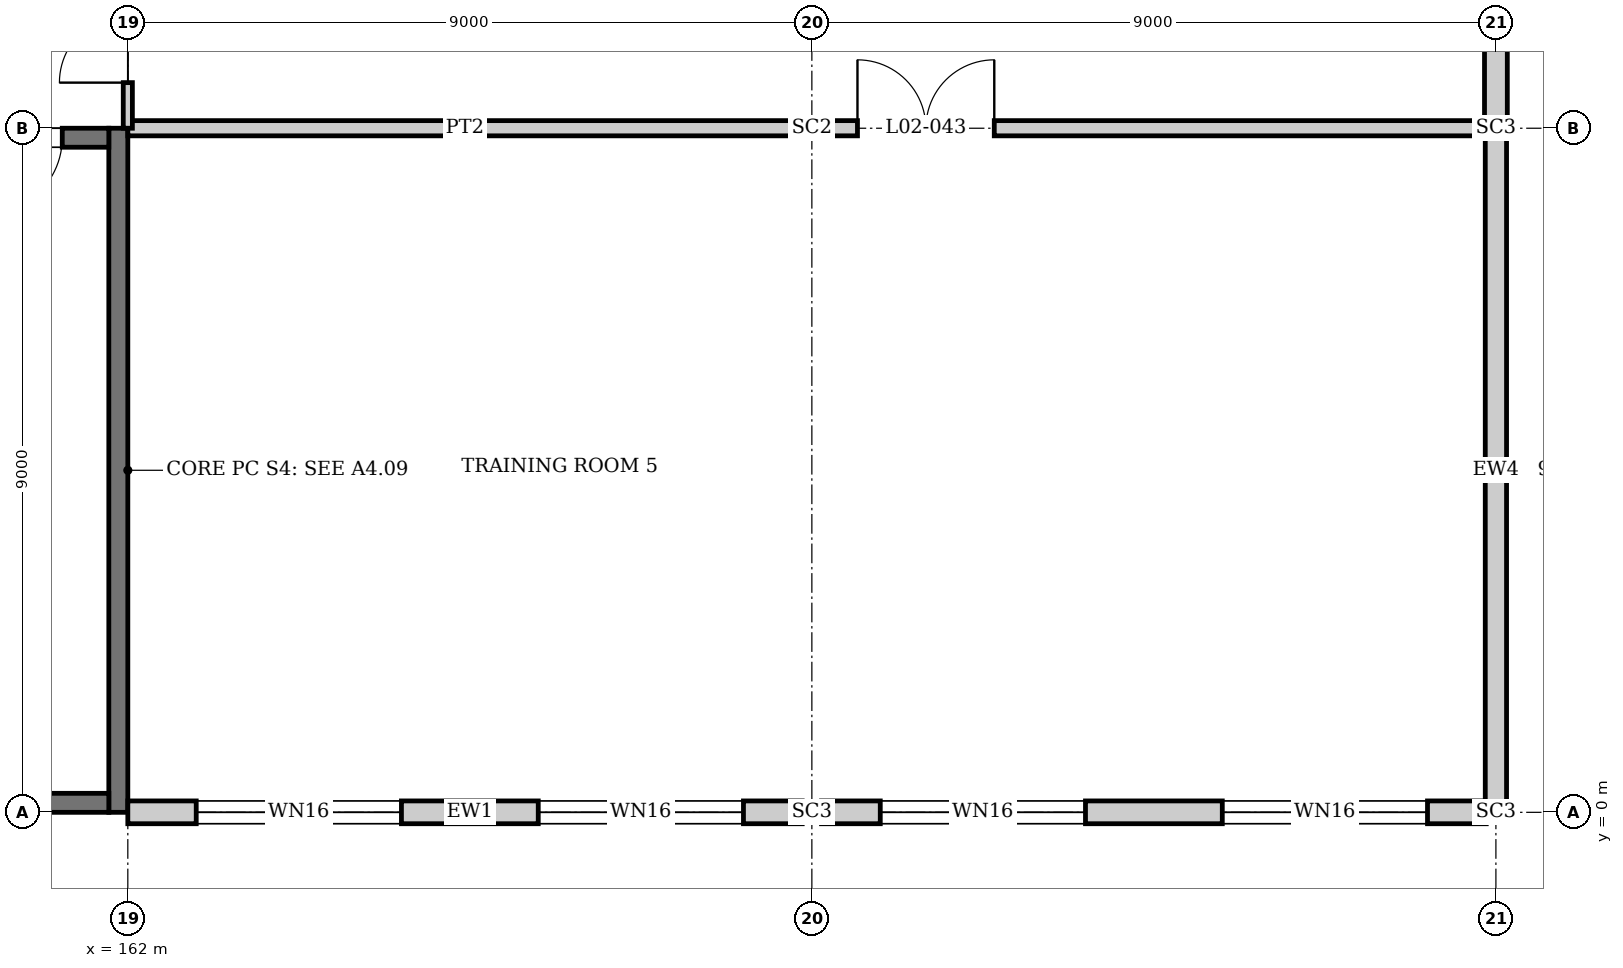
"""IFC4 building model, lengths in metres.
Left out: names, types, materials, properties, quantities, classifications, styles, units other than length and angle.
Written with IfcOpenShell. Run it as: python <this file> out.ifc"""

import sys

from ifc_helpers import new_model, si_unit, direction, frame, frame_2d, origin, origin_2d, place, context, subcontext, project, spatial, rectangle, i_section, extrude, element, fill, save


model = new_model("IFC4")
c1 = context("Model", 3, precision=1e-05, world=origin(), true_north=direction((0.0, 1.0)))
c2 = subcontext(c1, "Body", "Model", "MODEL_VIEW")
j1 = project(units=[si_unit("LENGTHUNIT", "METRE"), si_unit("PLANEANGLEUNIT", "RADIAN")], contexts=[c1])
p1 = place(None, origin())
s1 = spatial("IfcSite", under=j1, at=p1, CompositionType="ELEMENT")
p2 = place(p1, origin())
s2 = spatial("IfcBuilding", under=s1, at=p2, CompositionType="ELEMENT")
p3 = place(p2, frame((0.0, 0.0, 10.5)))
s3 = spatial("IfcBuildingStorey", under=s2, at=p3, CompositionType="ELEMENT", Elevation=10.5)
p4 = place(p3, frame((171.0, 0.0, 0.0), z_axis=(0.0, 0.0, 1.0), x_axis=(0.0, 1.0, 0.0)))
e1 = element("IfcColumn", 1, at=p4, inside=s3, PredefinedType="COLUMN", context=c2, shape_type="SweptSolid", body=[
    extrude(i_section(OverallWidth=0.254, OverallDepth=0.254, WebThickness=0.009, FlangeThickness=0.014, at=origin_2d()), origin(), (0.0, 0.0, 1.0), 4.5),
])
p5 = place(p3, frame((171.0, 9.0, 0.0), z_axis=(0.0, 0.0, 1.0), x_axis=(0.0, 1.0, 0.0)))
e2 = element("IfcColumn", 2, at=p5, inside=s3, PredefinedType="COLUMN", context=c2, shape_type="SweptSolid", body=[
    extrude(i_section(OverallWidth=0.256, OverallDepth=0.26, WebThickness=0.01, FlangeThickness=0.017, at=origin_2d()), origin(), (0.0, 0.0, 1.0), 4.5),
])
for number, where, z_axis, x_axis in (
    (3, (180.0, 0.0, 0.0), (0.0, 0.0, 1.0), (0.0, 1.0, 0.0)),
    (4, (180.0, 9.0, 0.0), (0.0, 0.0, 1.0), (0.0, 1.0, 0.0)),
):
    element("IfcColumn", number, at=place(p3, frame(where, z_axis=z_axis, x_axis=x_axis)), inside=s3, PredefinedType="COLUMN", context=c2, shape_type="SweptSolid", body=[
        extrude(i_section(OverallWidth=0.254, OverallDepth=0.254, WebThickness=0.009, FlangeThickness=0.014, at=origin_2d()), origin(), (0.0, 0.0, 1.0), 4.5),
    ])
p6 = place(p3, frame((161.875, 0.0, 0.0), z_axis=(0.0, 0.0, 1.0), x_axis=(0.0, 1.0, 0.0)))
e5 = element("IfcWall", 5, at=p6, inside=s3, PredefinedType="SHEAR", context=c2, shape_type="SweptSolid", body=[
    extrude(rectangle(XDim=9.0, YDim=0.25, at=frame_2d((4.5, 0.0))), origin(), (0.0, 0.0, 1.0), 4.35),
])
p7 = place(p3, frame((153.25, 0.125, 0.0), z_axis=(0.0, 0.0, 1.0), x_axis=(1.0, 0.0, 0.0)))
e6 = element("IfcWall", 6, at=p7, inside=s3, PredefinedType="SHEAR", context=c2, shape_type="SweptSolid", body=[
    extrude(rectangle(XDim=8.5, YDim=0.25, at=frame_2d((4.25, 0.0))), origin(), (0.0, 0.0, 1.0), 4.35),
])
p8 = place(p3, frame((153.25, 8.875, 0.0), z_axis=(0.0, 0.0, 1.0), x_axis=(1.0, 0.0, 0.0)))
e7 = element("IfcWall", 7, at=p8, inside=s3, PredefinedType="SHEAR", context=c2, shape_type="SweptSolid", body=[
    extrude(rectangle(XDim=8.5, YDim=0.25, at=frame_2d((4.25, 0.0))), origin(), (0.0, 0.0, 1.0), 4.35),
])
p9 = place(p8, frame((6.887, 0.0, 0.0)))
e8 = element("IfcOpeningElement", 8, at=p9, cuts=e7, PredefinedType="OPENING", context=c2, shape_type="SweptSolid", body=[
    extrude(rectangle(XDim=1.0, YDim=2.1, at=frame_2d((0.5, 1.05))), frame((0.0, 0.135, 0.0), z_axis=(0.0, -1.0, 0.0), x_axis=(1.0, 0.0, 0.0)), (0.0, 0.0, 1.0), 0.27),
])
p10 = place(p3, frame((162.0, 0.0, 0.0), z_axis=(0.0, 0.0, 1.0), x_axis=(1.0, 0.0, 0.0)))
e9 = element("IfcWall", 9, at=p10, inside=s3, PredefinedType="SOLIDWALL", context=c2, shape_type="SweptSolid", body=[
    extrude(rectangle(XDim=8.873, YDim=0.3, at=frame_2d((4.437, 0.0))), origin(), (0.0, 0.0, 1.0), 3.991),
])
p11 = place(p10, frame((0.9, 0.0, 0.9)))
e10 = element("IfcOpeningElement", 10, at=p11, cuts=e9, PredefinedType="OPENING", context=c2, shape_type="SweptSolid", body=[
    extrude(rectangle(XDim=2.7, YDim=1.8, at=frame_2d((1.35, 0.9))), frame((0.0, 0.16, 0.0), z_axis=(0.0, -1.0, 0.0), x_axis=(1.0, 0.0, 0.0)), (0.0, 0.0, 1.0), 0.32),
])
p12 = place(p10, frame((5.4, 0.0, 0.9)))
e11 = element("IfcOpeningElement", 11, at=p12, cuts=e9, PredefinedType="OPENING", context=c2, shape_type="SweptSolid", body=[
    extrude(rectangle(XDim=2.7, YDim=1.8, at=frame_2d((1.35, 0.9))), frame((0.0, 0.16, 0.0), z_axis=(0.0, -1.0, 0.0), x_axis=(1.0, 0.0, 0.0)), (0.0, 0.0, 1.0), 0.32),
])
p13 = place(p3, frame((171.127, 0.0, 0.0), z_axis=(0.0, 0.0, 1.0), x_axis=(1.0, 0.0, 0.0)))
e12 = element("IfcWall", 12, at=p13, inside=s3, PredefinedType="SOLIDWALL", context=c2, shape_type="SweptSolid", body=[
    extrude(rectangle(XDim=8.746, YDim=0.3, at=frame_2d((4.373, 0.0))), origin(), (0.0, 0.0, 1.0), 3.991),
])
p14 = place(p13, frame((0.773, 0.0, 0.9)))
e13 = element("IfcOpeningElement", 13, at=p14, cuts=e12, PredefinedType="OPENING", context=c2, shape_type="SweptSolid", body=[
    extrude(rectangle(XDim=2.7, YDim=1.8, at=frame_2d((1.35, 0.9))), frame((0.0, 0.16, 0.0), z_axis=(0.0, -1.0, 0.0), x_axis=(1.0, 0.0, 0.0)), (0.0, 0.0, 1.0), 0.32),
])
p15 = place(p13, frame((5.273, 0.0, 0.9)))
e14 = element("IfcOpeningElement", 14, at=p15, cuts=e12, PredefinedType="OPENING", context=c2, shape_type="SweptSolid", body=[
    extrude(rectangle(XDim=2.7, YDim=1.8, at=frame_2d((1.35, 0.9))), frame((0.0, 0.16, 0.0), z_axis=(0.0, -1.0, 0.0), x_axis=(1.0, 0.0, 0.0)), (0.0, 0.0, 1.0), 0.32),
])
p16 = place(p3, frame((180.0, 0.127, 0.0), z_axis=(0.0, 0.0, 1.0), x_axis=(0.0, 1.0, 0.0)))
e15 = element("IfcWall", 15, at=p16, inside=s3, PredefinedType="SOLIDWALL", context=c2, shape_type="SweptSolid", body=[
    extrude(rectangle(XDim=8.746, YDim=0.28, at=frame_2d((4.373, 0.0))), origin(), (0.0, 0.0, 1.0), 3.991),
])
p17 = place(p3, frame((180.0, 9.127, 0.0), z_axis=(0.0, 0.0, 1.0), x_axis=(0.0, 1.0, 0.0)))
e16 = element("IfcWall", 16, at=p17, inside=s3, PredefinedType="SOLIDWALL", context=c2, shape_type="SweptSolid", body=[
    extrude(rectangle(XDim=8.873, YDim=0.3, at=frame_2d((4.437, 0.0))), origin(), (0.0, 0.0, 1.0), 3.991),
])
p18 = place(p17, frame((1.223, 0.0, 0.9)))
e17 = element("IfcOpeningElement", 17, at=p18, cuts=e16, PredefinedType="OPENING", context=c2, shape_type="SweptSolid", body=[
    extrude(rectangle(XDim=1.8, YDim=2.4, at=frame_2d((0.9, 1.2))), frame((0.0, 0.16, 0.0), z_axis=(0.0, -1.0, 0.0), x_axis=(1.0, 0.0, 0.0)), (0.0, 0.0, 1.0), 0.32),
])
p19 = place(p17, frame((5.723, 0.0, 0.9)))
e18 = element("IfcOpeningElement", 18, at=p19, cuts=e16, PredefinedType="OPENING", context=c2, shape_type="SweptSolid", body=[
    extrude(rectangle(XDim=1.8, YDim=2.4, at=frame_2d((0.9, 1.2))), frame((0.0, 0.16, 0.0), z_axis=(0.0, -1.0, 0.0), x_axis=(1.0, 0.0, 0.0)), (0.0, 0.0, 1.0), 0.32),
])
p20 = place(p3, frame((162.0, 9.0, 0.0), z_axis=(0.0, 0.0, 1.0), x_axis=(1.0, 0.0, 0.0)))
e19 = element("IfcWall", 19, at=p20, inside=s3, PredefinedType="PARTITIONING", context=c2, shape_type="SweptSolid", body=[
    extrude(rectangle(XDim=8.87, YDim=0.2, at=frame_2d((4.435, 0.0))), origin(), (0.0, 0.0, 1.0), 3.822),
])
p21 = place(p3, frame((171.13, 9.0, 0.0), z_axis=(0.0, 0.0, 1.0), x_axis=(1.0, 0.0, 0.0)))
e20 = element("IfcWall", 20, at=p21, inside=s3, PredefinedType="PARTITIONING", context=c2, shape_type="SweptSolid", body=[
    extrude(rectangle(XDim=8.743, YDim=0.2, at=frame_2d((4.372, 0.0))), origin(), (0.0, 0.0, 1.0), 3.822),
])
p22 = place(p21, frame((0.47, 0.0, 0.0)))
e21 = element("IfcOpeningElement", 21, at=p22, cuts=e20, PredefinedType="OPENING", context=c2, shape_type="SweptSolid", body=[
    extrude(rectangle(XDim=1.8, YDim=2.1, at=frame_2d((0.9, 1.05))), frame((0.0, 0.11, 0.0), z_axis=(0.0, -1.0, 0.0), x_axis=(1.0, 0.0, 0.0)), (0.0, 0.0, 1.0), 0.22),
])
p23 = place(p3, frame((162.0, 9.0, 0.0), z_axis=(0.0, 0.0, 1.0), x_axis=(0.0, 1.0, 0.0)))
e22 = element("IfcWall", 22, at=p23, inside=s3, PredefinedType="PARTITIONING", context=c2, shape_type="SweptSolid", body=[
    extrude(rectangle(XDim=3.0, YDim=0.12, at=frame_2d((1.5, 0.0))), origin(), (0.0, 0.0, 1.0), 2.414),
])
p24 = place(p23, frame((0.6, 0.0, 0.0)))
e23 = element("IfcOpeningElement", 23, at=p24, cuts=e22, PredefinedType="OPENING", context=c2, shape_type="SweptSolid", body=[
    extrude(rectangle(XDim=1.8, YDim=2.1, at=frame_2d((0.9, 1.05))), frame((0.0, 0.07, 0.0), z_axis=(0.0, -1.0, 0.0), x_axis=(1.0, 0.0, 0.0)), (0.0, 0.0, 1.0), 0.14),
])
p25 = place(p11, origin())
e24 = element("IfcWindow", 24, at=p25, inside=s3, PartitioningType="SINGLE_PANEL", PredefinedType="WINDOW", context=c2, shape_type="SweptSolid", body=[
    extrude(rectangle(XDim=2.7, YDim=1.8, at=frame_2d((1.35, 0.9))), frame((0.0, 0.03, 0.0), z_axis=(0.0, -1.0, 0.0), x_axis=(1.0, 0.0, 0.0)), (0.0, 0.0, 1.0), 0.06),
])
fill(e10, e24)
p26 = place(p12, origin())
e25 = element("IfcWindow", 25, at=p26, inside=s3, PartitioningType="SINGLE_PANEL", PredefinedType="WINDOW", context=c2, shape_type="SweptSolid", body=[
    extrude(rectangle(XDim=2.7, YDim=1.8, at=frame_2d((1.35, 0.9))), frame((0.0, 0.03, 0.0), z_axis=(0.0, -1.0, 0.0), x_axis=(1.0, 0.0, 0.0)), (0.0, 0.0, 1.0), 0.06),
])
fill(e11, e25)
p27 = place(p14, origin())
e26 = element("IfcWindow", 26, at=p27, inside=s3, PartitioningType="SINGLE_PANEL", PredefinedType="WINDOW", context=c2, shape_type="SweptSolid", body=[
    extrude(rectangle(XDim=2.7, YDim=1.8, at=frame_2d((1.35, 0.9))), frame((0.0, 0.03, 0.0), z_axis=(0.0, -1.0, 0.0), x_axis=(1.0, 0.0, 0.0)), (0.0, 0.0, 1.0), 0.06),
])
fill(e13, e26)
p28 = place(p15, origin())
e27 = element("IfcWindow", 27, at=p28, inside=s3, PartitioningType="SINGLE_PANEL", PredefinedType="WINDOW", context=c2, shape_type="SweptSolid", body=[
    extrude(rectangle(XDim=2.7, YDim=1.8, at=frame_2d((1.35, 0.9))), frame((0.0, 0.03, 0.0), z_axis=(0.0, -1.0, 0.0), x_axis=(1.0, 0.0, 0.0)), (0.0, 0.0, 1.0), 0.06),
])
fill(e14, e27)
p29 = place(p9, frame((1.0, 0.0, 0.0), z_axis=(0.0, 0.0, 1.0), x_axis=(-1.0, 0.0, 0.0)))
e28 = element("IfcDoor", 28, at=p29, inside=s3, OperationType="SINGLE_SWING_RIGHT", PredefinedType="DOOR", context=c2, shape_type="SweptSolid", body=[
    extrude(rectangle(XDim=1.0, YDim=2.1, at=frame_2d((0.5, 1.05))), frame((0.0, 0.025, 0.0), z_axis=(0.0, -1.0, 0.0), x_axis=(1.0, 0.0, 0.0)), (0.0, 0.0, 1.0), 0.05),
])
fill(e8, e28)
p30 = place(p24, origin())
e29 = element("IfcDoor", 29, at=p30, inside=s3, OperationType="DOUBLE_DOOR_SINGLE_SWING", PredefinedType="DOOR", context=c2, shape_type="SweptSolid", body=[
    extrude(rectangle(XDim=1.8, YDim=2.1, at=frame_2d((0.9, 1.05))), frame((0.0, 0.025, 0.0), z_axis=(0.0, -1.0, 0.0), x_axis=(1.0, 0.0, 0.0)), (0.0, 0.0, 1.0), 0.05),
])
fill(e23, e29)
p31 = place(p22, origin())
e30 = element("IfcDoor", 30, at=p31, inside=s3, OperationType="DOUBLE_DOOR_SINGLE_SWING", PredefinedType="DOOR", context=c2, shape_type="SweptSolid", body=[
    extrude(rectangle(XDim=1.8, YDim=2.1, at=frame_2d((0.9, 1.05))), frame((0.0, 0.025, 0.0), z_axis=(0.0, -1.0, 0.0), x_axis=(1.0, 0.0, 0.0)), (0.0, 0.0, 1.0), 0.05),
])
fill(e21, e30)
save(model, sys.argv[1])
